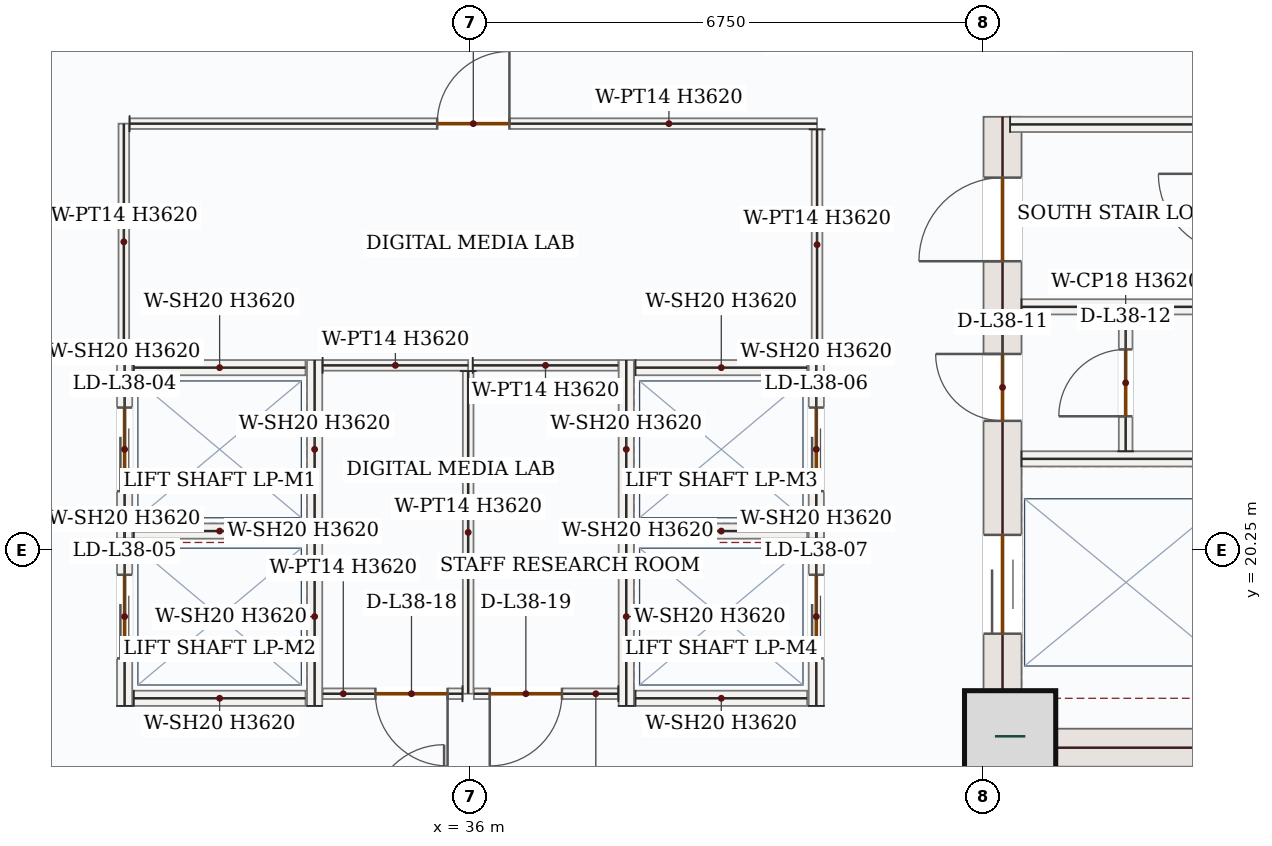
"""IFC4 building model, lengths in metres.
Left out: names, types, materials, properties, quantities, classifications, styles, units other than length and angle.
Written with IfcOpenShell. Run it as: python <this file> out.ifc"""

import sys

from ifc_helpers import new_model, si_unit, direction, frame, frame_2d, origin, origin_2d, place, context, subcontext, project, spatial, rectangle, extrude, source, transform, mapped, element, fill, save


model = new_model("IFC4")
c1 = context("Model", 3, precision=1e-05, world=origin(), true_north=direction((0.0, 1.0)))
c2 = subcontext(c1, "Body", "Model", "MODEL_VIEW")
j1 = project(units=[si_unit("LENGTHUNIT", "METRE"), si_unit("PLANEANGLEUNIT", "RADIAN")], contexts=[c1])
p1 = place(None, origin())
s1 = spatial("IfcSite", under=j1, at=p1, CompositionType="ELEMENT")
p2 = place(p1, origin())
s2 = spatial("IfcBuilding", under=s1, at=p2, CompositionType="ELEMENT")
p3 = place(p2, frame((0.0, 0.0, 166.8)))
s3 = spatial("IfcBuildingStorey", under=s2, at=p3, CompositionType="ELEMENT", Elevation=166.8)
p4 = place(p3, frame((43.0, 17.4, 0.0), z_axis=(0.0, 0.0, 1.0), x_axis=(0.0, 1.0, 0.0)))
e1 = element("IfcWall", 1, at=p4, inside=s3, PredefinedType="SHEAR", context=c2, shape_type="SweptSolid", body=[
    extrude(rectangle(XDim=8.55, YDim=0.5, at=frame_2d((4.275, 0.0))), origin(), (0.0, 0.0, 1.0), 3.62),
])
p5 = place(p4, frame((6.65, 0.0, 0.0)))
e2 = element("IfcOpeningElement", 2, at=p5, cuts=e1, PredefinedType="OPENING", context=c2, shape_type="SweptSolid", body=[
    extrude(rectangle(XDim=1.1, YDim=2.2, at=frame_2d((0.55, 1.1))), frame((0.0, 0.26, 0.0), z_axis=(0.0, -1.0, 0.0), x_axis=(1.0, 0.0, 0.0)), (0.0, 0.0, 1.0), 0.52),
])
p6 = place(p4, frame((1.75, 0.0, 0.0)))
e3 = element("IfcOpeningElement", 3, at=p6, cuts=e1, PredefinedType="OPENING", context=c2, shape_type="SweptSolid", body=[
    extrude(rectangle(XDim=1.3, YDim=2.2, at=frame_2d((0.65, 1.1))), frame((0.0, 0.26, 0.0), z_axis=(0.0, -1.0, 0.0), x_axis=(1.0, 0.0, 0.0)), (0.0, 0.0, 1.0), 0.52),
])
p7 = place(p4, frame((4.55, 0.0, 0.0)))
e4 = element("IfcOpeningElement", 4, at=p7, cuts=e1, PredefinedType="OPENING", context=c2, shape_type="SweptSolid", body=[
    extrude(rectangle(XDim=0.88, YDim=2.1, at=frame_2d((0.44, 1.05))), frame((0.0, 0.26, 0.0), z_axis=(0.0, -1.0, 0.0), x_axis=(1.0, 0.0, 0.0)), (0.0, 0.0, 1.0), 0.52),
])
m1 = source(origin(), c2, "Body", "SweptSolid", [
    extrude(rectangle(XDim=7.0, YDim=0.5, at=frame_2d((3.5, 0.0))), origin(), (0.0, 0.0, 1.0), 3.62),
])
p8 = place(p3, frame((43.25, 17.65, 0.0), z_axis=(0.0, 0.0, 1.0), x_axis=(1.0, 0.0, 0.0)))
e5 = element("IfcWall", 5, at=p8, inside=s3, PredefinedType="SHEAR", context=c2, shape_type="MappedRepresentation", body=[
    mapped(m1, transform((0.0, 0.0, 0.0), x_axis=(1.0, 0.0, 0.0), y_axis=(0.0, 1.0, 0.0), z_axis=(0.0, 0.0, 1.0), scale=1.0)),
])
m2 = source(origin(), c2, "Body", "SweptSolid", [
    extrude(rectangle(XDim=1.2, YDim=1.2, at=origin_2d()), origin(), (0.0, 0.0, 1.0), 3.9),
])
p9 = place(p3, frame((43.1, 17.8, 0.0), z_axis=(0.0, 0.0, 1.0), x_axis=(1.0, 0.0, 0.0)))
e6 = element("IfcColumn", 6, at=p9, inside=s3, PredefinedType="COLUMN", context=c2, shape_type="MappedRepresentation", body=[
    mapped(m2, transform((0.0, 0.0, 0.0), x_axis=(1.0, 0.0, 0.0), y_axis=(0.0, 1.0, 0.0), z_axis=(0.0, 0.0, 1.0), scale=1.0)),
])
m3 = source(origin(), c2, "Body", "SweptSolid", [
    extrude(rectangle(XDim=3.0, YDim=0.2, at=frame_2d((1.5, 0.0))), origin(), (0.0, 0.0, 1.0), 3.62),
])
p10 = place(p3, frame((43.1, 25.85, 0.0), z_axis=(0.0, 0.0, 1.0), x_axis=(1.0, 0.0, 0.0)))
e7 = element("IfcWall", 7, at=p10, inside=s3, PredefinedType="SOLIDWALL", context=c2, shape_type="MappedRepresentation", body=[
    mapped(m3, transform((0.0, 0.0, 0.0), x_axis=(1.0, 0.0, 0.0), y_axis=(0.0, 1.0, 0.0), z_axis=(0.0, 0.0, 1.0), scale=1.0)),
])
m4 = source(origin(), c2, "Body", "SweptSolid", [
    extrude(rectangle(XDim=2.75, YDim=0.2, at=frame_2d((1.375, 0.0))), origin(), (0.0, 0.0, 1.0), 3.62),
])
for number, where, z_axis, x_axis in (
    (8, (43.25, 23.45, 0.0), (0.0, 0.0, 1.0), (1.0, 0.0, 0.0)),
    (9, (43.25, 21.45, 0.0), (0.0, 0.0, 1.0), (1.0, 0.0, 0.0)),
):
    element("IfcWall", number, at=place(p3, frame(where, z_axis=z_axis, x_axis=x_axis)), inside=s3, PredefinedType="SOLIDWALL", context=c2, shape_type="MappedRepresentation", body=[
        mapped(m4, transform((0.0, 0.0, 0.0), x_axis=(1.0, 0.0, 0.0), y_axis=(0.0, 1.0, 0.0), z_axis=(0.0, 0.0, 1.0), scale=1.0)),
    ])
p11 = place(p3, frame((44.62, 21.55, 0.0), z_axis=(0.0, 0.0, 1.0), x_axis=(0.0, 1.0, 0.0)))
e10 = element("IfcWall", 10, at=p11, inside=s3, PredefinedType="PARTITIONING", context=c2, shape_type="SweptSolid", body=[
    extrude(rectangle(XDim=1.8, YDim=0.18, at=frame_2d((0.9, 0.0))), origin(), (0.0, 0.0, 1.0), 3.62),
])
p12 = place(p11, frame((0.46, 0.0, 0.0)))
e11 = element("IfcOpeningElement", 11, at=p12, cuts=e10, PredefinedType="OPENING", context=c2, shape_type="SweptSolid", body=[
    extrude(rectangle(XDim=0.88, YDim=2.1, at=frame_2d((0.44, 1.05))), frame((0.0, 0.1, 0.0), z_axis=(0.0, -1.0, 0.0), x_axis=(1.0, 0.0, 0.0)), (0.0, 0.0, 1.0), 0.2),
])
p13 = place(p3, frame((31.45, 20.4, 0.0), z_axis=(0.0, 0.0, 1.0), x_axis=(0.0, 1.0, 0.0)))
e12 = element("IfcWall", 12, at=p13, inside=s3, PredefinedType="SOLIDWALL", context=c2, shape_type="SweptSolid", body=[
    extrude(rectangle(XDim=2.35, YDim=0.2, at=frame_2d((1.175, 0.0))), origin(), (0.0, 0.0, 1.0), 3.62),
])
p14 = place(p13, frame((0.625, 0.0, 0.0)))
e13 = element("IfcOpeningElement", 13, at=p14, cuts=e12, PredefinedType="OPENING", context=c2, shape_type="SweptSolid", body=[
    extrude(rectangle(XDim=1.1, YDim=2.15, at=frame_2d((0.55, 1.075))), frame((0.0, 0.11, 0.0), z_axis=(0.0, -1.0, 0.0), x_axis=(1.0, 0.0, 0.0)), (0.0, 0.0, 1.0), 0.22),
])
m5 = source(origin(), c2, "Body", "SweptSolid", [
    extrude(rectangle(XDim=2.35, YDim=0.2, at=frame_2d((1.175, 0.0))), origin(), (0.0, 0.0, 1.0), 3.62),
])
p15 = place(p3, frame((33.95, 20.4, 0.0), z_axis=(0.0, 0.0, 1.0), x_axis=(0.0, 1.0, 0.0)))
e14 = element("IfcWall", 14, at=p15, inside=s3, PredefinedType="SOLIDWALL", context=c2, shape_type="MappedRepresentation", body=[
    mapped(m5, transform((0.0, 0.0, 0.0), x_axis=(1.0, 0.0, 0.0), y_axis=(0.0, 1.0, 0.0), z_axis=(0.0, 0.0, 1.0), scale=1.0)),
])
m6 = source(origin(), c2, "Body", "SweptSolid", [
    extrude(rectangle(XDim=2.26, YDim=0.2, at=frame_2d((1.13, 0.0))), origin(), (0.0, 0.0, 1.0), 3.62),
])
for number, where, z_axis, x_axis in (
    (15, (31.57, 20.5, 0.0), (0.0, 0.0, 1.0), (1.0, 0.0, 0.0)),
    (16, (31.57, 22.65, 0.0), (0.0, 0.0, 1.0), (1.0, 0.0, 0.0)),
):
    element("IfcWall", number, at=place(p3, frame(where, z_axis=z_axis, x_axis=x_axis)), inside=s3, PredefinedType="SOLIDWALL", context=c2, shape_type="MappedRepresentation", body=[
        mapped(m6, transform((0.0, 0.0, 0.0), x_axis=(1.0, 0.0, 0.0), y_axis=(0.0, 1.0, 0.0), z_axis=(0.0, 0.0, 1.0), scale=1.0)),
    ])
p16 = place(p3, frame((31.45, 18.2, 0.0), z_axis=(0.0, 0.0, 1.0), x_axis=(0.0, 1.0, 0.0)))
e17 = element("IfcWall", 17, at=p16, inside=s3, PredefinedType="SOLIDWALL", context=c2, shape_type="SweptSolid", body=[
    extrude(rectangle(XDim=2.35, YDim=0.2, at=frame_2d((1.175, 0.0))), origin(), (0.0, 0.0, 1.0), 3.62),
])
p17 = place(p16, frame((0.625, 0.0, 0.0)))
e18 = element("IfcOpeningElement", 18, at=p17, cuts=e17, PredefinedType="OPENING", context=c2, shape_type="SweptSolid", body=[
    extrude(rectangle(XDim=1.1, YDim=2.15, at=frame_2d((0.55, 1.075))), frame((0.0, 0.11, 0.0), z_axis=(0.0, -1.0, 0.0), x_axis=(1.0, 0.0, 0.0)), (0.0, 0.0, 1.0), 0.22),
])
p18 = place(p3, frame((33.95, 18.2, 0.0), z_axis=(0.0, 0.0, 1.0), x_axis=(0.0, 1.0, 0.0)))
e19 = element("IfcWall", 19, at=p18, inside=s3, PredefinedType="SOLIDWALL", context=c2, shape_type="MappedRepresentation", body=[
    mapped(m5, transform((0.0, 0.0, 0.0), x_axis=(1.0, 0.0, 0.0), y_axis=(0.0, 1.0, 0.0), z_axis=(0.0, 0.0, 1.0), scale=1.0)),
])
p19 = place(p3, frame((31.57, 18.3, 0.0), z_axis=(0.0, 0.0, 1.0), x_axis=(1.0, 0.0, 0.0)))
e20 = element("IfcWall", 20, at=p19, inside=s3, PredefinedType="SOLIDWALL", context=c2, shape_type="MappedRepresentation", body=[
    mapped(m6, transform((0.0, 0.0, 0.0), x_axis=(1.0, 0.0, 0.0), y_axis=(0.0, 1.0, 0.0), z_axis=(0.0, 0.0, 1.0), scale=1.0)),
])
p20 = place(p3, frame((38.05, 20.4, 0.0), z_axis=(0.0, 0.0, 1.0), x_axis=(0.0, 1.0, 0.0)))
e21 = element("IfcWall", 21, at=p20, inside=s3, PredefinedType="SOLIDWALL", context=c2, shape_type="MappedRepresentation", body=[
    mapped(m5, transform((0.0, 0.0, 0.0), x_axis=(1.0, 0.0, 0.0), y_axis=(0.0, 1.0, 0.0), z_axis=(0.0, 0.0, 1.0), scale=1.0)),
])
p21 = place(p3, frame((40.55, 20.4, 0.0), z_axis=(0.0, 0.0, 1.0), x_axis=(0.0, 1.0, 0.0)))
e22 = element("IfcWall", 22, at=p21, inside=s3, PredefinedType="SOLIDWALL", context=c2, shape_type="SweptSolid", body=[
    extrude(rectangle(XDim=2.35, YDim=0.2, at=frame_2d((1.175, 0.0))), origin(), (0.0, 0.0, 1.0), 3.62),
])
p22 = place(p21, frame((0.625, 0.0, 0.0)))
e23 = element("IfcOpeningElement", 23, at=p22, cuts=e22, PredefinedType="OPENING", context=c2, shape_type="SweptSolid", body=[
    extrude(rectangle(XDim=1.1, YDim=2.15, at=frame_2d((0.55, 1.075))), frame((0.0, 0.11, 0.0), z_axis=(0.0, -1.0, 0.0), x_axis=(1.0, 0.0, 0.0)), (0.0, 0.0, 1.0), 0.22),
])
for number, where, z_axis, x_axis in (
    (24, (38.17, 20.5, 0.0), (0.0, 0.0, 1.0), (1.0, 0.0, 0.0)),
    (25, (38.17, 22.65, 0.0), (0.0, 0.0, 1.0), (1.0, 0.0, 0.0)),
):
    element("IfcWall", number, at=place(p3, frame(where, z_axis=z_axis, x_axis=x_axis)), inside=s3, PredefinedType="SOLIDWALL", context=c2, shape_type="MappedRepresentation", body=[
        mapped(m6, transform((0.0, 0.0, 0.0), x_axis=(1.0, 0.0, 0.0), y_axis=(0.0, 1.0, 0.0), z_axis=(0.0, 0.0, 1.0), scale=1.0)),
    ])
p23 = place(p3, frame((38.05, 18.2, 0.0), z_axis=(0.0, 0.0, 1.0), x_axis=(0.0, 1.0, 0.0)))
e26 = element("IfcWall", 26, at=p23, inside=s3, PredefinedType="SOLIDWALL", context=c2, shape_type="MappedRepresentation", body=[
    mapped(m5, transform((0.0, 0.0, 0.0), x_axis=(1.0, 0.0, 0.0), y_axis=(0.0, 1.0, 0.0), z_axis=(0.0, 0.0, 1.0), scale=1.0)),
])
p24 = place(p3, frame((40.55, 18.2, 0.0), z_axis=(0.0, 0.0, 1.0), x_axis=(0.0, 1.0, 0.0)))
e27 = element("IfcWall", 27, at=p24, inside=s3, PredefinedType="SOLIDWALL", context=c2, shape_type="SweptSolid", body=[
    extrude(rectangle(XDim=2.35, YDim=0.2, at=frame_2d((1.175, 0.0))), origin(), (0.0, 0.0, 1.0), 3.62),
])
p25 = place(p24, frame((0.625, 0.0, 0.0)))
e28 = element("IfcOpeningElement", 28, at=p25, cuts=e27, PredefinedType="OPENING", context=c2, shape_type="SweptSolid", body=[
    extrude(rectangle(XDim=1.1, YDim=2.15, at=frame_2d((0.55, 1.075))), frame((0.0, 0.11, 0.0), z_axis=(0.0, -1.0, 0.0), x_axis=(1.0, 0.0, 0.0)), (0.0, 0.0, 1.0), 0.22),
])
p26 = place(p3, frame((38.17, 18.3, 0.0), z_axis=(0.0, 0.0, 1.0), x_axis=(1.0, 0.0, 0.0)))
e29 = element("IfcWall", 29, at=p26, inside=s3, PredefinedType="SOLIDWALL", context=c2, shape_type="MappedRepresentation", body=[
    mapped(m6, transform((0.0, 0.0, 0.0), x_axis=(1.0, 0.0, 0.0), y_axis=(0.0, 1.0, 0.0), z_axis=(0.0, 0.0, 1.0), scale=1.0)),
])
m7 = source(origin(), c2, "Body", "SweptSolid", [
    extrude(rectangle(XDim=1.915, YDim=0.14, at=frame_2d((0.958, 0.0))), origin(), (0.0, 0.0, 1.0), 3.62),
])
p27 = place(p3, frame((34.055, 22.68, 0.0), z_axis=(0.0, 0.0, 1.0), x_axis=(1.0, 0.0, 0.0)))
e30 = element("IfcWall", 30, at=p27, inside=s3, PredefinedType="PARTITIONING", context=c2, shape_type="MappedRepresentation", body=[
    mapped(m7, transform((0.0, 0.0, 0.0), x_axis=(1.0, 0.0, 0.0), y_axis=(0.0, 1.0, 0.0), z_axis=(0.0, 0.0, 1.0), scale=1.0)),
])
m8 = source(origin(), c2, "Body", "SweptSolid", [
    extrude(rectangle(XDim=4.245, YDim=0.14, at=frame_2d((2.123, 0.0))), origin(), (0.0, 0.0, 1.0), 3.62),
])
p28 = place(p3, frame((35.97, 22.605, 0.0), z_axis=(0.0, 0.0, 1.0), x_axis=(0.0, -1.0, 0.0)))
e31 = element("IfcWall", 31, at=p28, inside=s3, PredefinedType="PARTITIONING", context=c2, shape_type="MappedRepresentation", body=[
    mapped(m8, transform((0.0, 0.0, 0.0), x_axis=(1.0, 0.0, 0.0), y_axis=(0.0, 1.0, 0.0), z_axis=(0.0, 0.0, 1.0), scale=1.0)),
])
p29 = place(p3, frame((35.895, 18.36, 0.0), z_axis=(0.0, 0.0, 1.0), x_axis=(-1.0, 0.0, 0.0)))
e32 = element("IfcWall", 32, at=p29, inside=s3, PredefinedType="PARTITIONING", context=c2, shape_type="SweptSolid", body=[
    extrude(rectangle(XDim=1.84, YDim=0.14, at=frame_2d((0.92, 0.0))), origin(), (0.0, 0.0, 1.0), 3.62),
])
p30 = place(p29, frame((0.196, 0.0, 0.0)))
e33 = element("IfcOpeningElement", 33, at=p30, cuts=e32, PredefinedType="OPENING", context=c2, shape_type="SweptSolid", body=[
    extrude(rectangle(XDim=0.95, YDim=2.15, at=frame_2d((0.475, 1.075))), frame((0.0, 0.08, 0.0), z_axis=(0.0, -1.0, 0.0), x_axis=(1.0, 0.0, 0.0)), (0.0, 0.0, 1.0), 0.16),
])
p31 = place(p3, frame((36.03, 22.68, 0.0), z_axis=(0.0, 0.0, 1.0), x_axis=(1.0, 0.0, 0.0)))
e34 = element("IfcWall", 34, at=p31, inside=s3, PredefinedType="PARTITIONING", context=c2, shape_type="MappedRepresentation", body=[
    mapped(m7, transform((0.0, 0.0, 0.0), x_axis=(1.0, 0.0, 0.0), y_axis=(0.0, 1.0, 0.0), z_axis=(0.0, 0.0, 1.0), scale=1.0)),
])
p32 = place(p3, frame((37.945, 18.36, 0.0), z_axis=(0.0, 0.0, 1.0), x_axis=(-1.0, 0.0, 0.0)))
e35 = element("IfcWall", 35, at=p32, inside=s3, PredefinedType="PARTITIONING", context=c2, shape_type="SweptSolid", body=[
    extrude(rectangle(XDim=1.9, YDim=0.14, at=frame_2d((0.95, 0.0))), origin(), (0.0, 0.0, 1.0), 3.62),
])
p33 = place(p32, frame((0.741, 0.0, 0.0)))
e36 = element("IfcOpeningElement", 36, at=p33, cuts=e35, PredefinedType="OPENING", context=c2, shape_type="SweptSolid", body=[
    extrude(rectangle(XDim=0.95, YDim=2.15, at=frame_2d((0.475, 1.075))), frame((0.0, 0.08, 0.0), z_axis=(0.0, -1.0, 0.0), x_axis=(1.0, 0.0, 0.0)), (0.0, 0.0, 1.0), 0.16),
])
m9 = source(origin(), c2, "Body", "SweptSolid", [
    extrude(rectangle(XDim=3.11, YDim=0.14, at=frame_2d((1.555, 0.0))), origin(), (0.0, 0.0, 1.0), 3.62),
])
p34 = place(p3, frame((31.44, 22.75, 0.0), z_axis=(0.0, 0.0, 1.0), x_axis=(0.0, 1.0, 0.0)))
e37 = element("IfcWall", 37, at=p34, inside=s3, PredefinedType="PARTITIONING", context=c2, shape_type="MappedRepresentation", body=[
    mapped(m9, transform((0.0, 0.0, 0.0), x_axis=(1.0, 0.0, 0.0), y_axis=(0.0, 1.0, 0.0), z_axis=(0.0, 0.0, 1.0), scale=1.0)),
])
p35 = place(p3, frame((31.515, 25.86, 0.0), z_axis=(0.0, 0.0, 1.0), x_axis=(1.0, 0.0, 0.0)))
e38 = element("IfcWall", 38, at=p35, inside=s3, PredefinedType="PARTITIONING", context=c2, shape_type="SweptSolid", body=[
    extrude(rectangle(XDim=9.045, YDim=0.14, at=frame_2d((4.522, 0.0))), origin(), (0.0, 0.0, 1.0), 3.62),
])
p36 = place(p35, frame((4.048, 0.0, 0.0)))
e39 = element("IfcOpeningElement", 39, at=p36, cuts=e38, PredefinedType="OPENING", context=c2, shape_type="SweptSolid", body=[
    extrude(rectangle(XDim=0.95, YDim=2.15, at=frame_2d((0.475, 1.075))), frame((0.0, 0.08, 0.0), z_axis=(0.0, -1.0, 0.0), x_axis=(1.0, 0.0, 0.0)), (0.0, 0.0, 1.0), 0.16),
])
m10 = source(origin(), c2, "Body", "SweptSolid", [
    extrude(rectangle(XDim=3.035, YDim=0.14, at=frame_2d((1.518, 0.0))), origin(), (0.0, 0.0, 1.0), 3.62),
])
p37 = place(p3, frame((40.56, 25.785, 0.0), z_axis=(0.0, 0.0, 1.0), x_axis=(0.0, -1.0, 0.0)))
e40 = element("IfcWall", 40, at=p37, inside=s3, PredefinedType="PARTITIONING", context=c2, shape_type="MappedRepresentation", body=[
    mapped(m10, transform((0.0, 0.0, 0.0), x_axis=(1.0, 0.0, 0.0), y_axis=(0.0, 1.0, 0.0), z_axis=(0.0, 0.0, 1.0), scale=1.0)),
])
m11 = source(origin(), c2, "Body", "SweptSolid", [
    extrude(rectangle(XDim=1.1, YDim=2.2, at=frame_2d((0.55, 1.1))), frame((0.0, 0.025, 0.0), z_axis=(0.0, -1.0, 0.0), x_axis=(1.0, 0.0, 0.0)), (0.0, 0.0, 1.0), 0.05),
])
p38 = place(p5, origin())
e41 = element("IfcDoor", 41, at=p38, inside=s3, OperationType="SINGLE_SWING_LEFT", PredefinedType="DOOR", context=c2, shape_type="MappedRepresentation", body=[
    mapped(m11, transform((0.0, 0.0, 0.0), x_axis=(1.0, 0.0, 0.0), y_axis=(0.0, 1.0, 0.0), z_axis=(0.0, 0.0, 1.0), scale=1.0)),
])
fill(e2, e41)
m12 = source(origin(), c2, "Body", "SweptSolid", [
    extrude(rectangle(XDim=1.3, YDim=2.2, at=frame_2d((0.65, 1.1))), frame((0.0, 0.025, 0.0), z_axis=(0.0, -1.0, 0.0), x_axis=(1.0, 0.0, 0.0)), (0.0, 0.0, 1.0), 0.05),
])
p39 = place(p6, origin())
e42 = element("IfcDoor", 42, at=p39, inside=s3, OperationType="DOUBLE_DOOR_SLIDING", PredefinedType="DOOR", context=c2, shape_type="MappedRepresentation", body=[
    mapped(m12, transform((0.0, 0.0, 0.0), x_axis=(1.0, 0.0, 0.0), y_axis=(0.0, 1.0, 0.0), z_axis=(0.0, 0.0, 1.0), scale=1.0)),
])
fill(e3, e42)
m13 = source(origin(), c2, "Body", "SweptSolid", [
    extrude(rectangle(XDim=0.88, YDim=2.1, at=frame_2d((0.44, 1.05))), frame((0.0, 0.025, 0.0), z_axis=(0.0, -1.0, 0.0), x_axis=(1.0, 0.0, 0.0)), (0.0, 0.0, 1.0), 0.05),
])
p40 = place(p7, origin())
e43 = element("IfcDoor", 43, at=p40, inside=s3, OperationType="SINGLE_SWING_RIGHT", PredefinedType="DOOR", context=c2, shape_type="MappedRepresentation", body=[
    mapped(m13, transform((0.0, 0.0, 0.0), x_axis=(1.0, 0.0, 0.0), y_axis=(0.0, 1.0, 0.0), z_axis=(0.0, 0.0, 1.0), scale=1.0)),
])
fill(e4, e43)
p41 = place(p12, origin())
e44 = element("IfcDoor", 44, at=p41, inside=s3, OperationType="SINGLE_SWING_LEFT", PredefinedType="DOOR", context=c2, shape_type="MappedRepresentation", body=[
    mapped(m13, transform((0.0, 0.0, 0.0), x_axis=(1.0, 0.0, 0.0), y_axis=(0.0, 1.0, 0.0), z_axis=(0.0, 0.0, 1.0), scale=1.0)),
])
fill(e11, e44)
m14 = source(origin(), c2, "Body", "SweptSolid", [
    extrude(rectangle(XDim=1.1, YDim=2.15, at=frame_2d((0.55, 1.075))), frame((0.0, 0.025, 0.0), z_axis=(0.0, -1.0, 0.0), x_axis=(1.0, 0.0, 0.0)), (0.0, 0.0, 1.0), 0.05),
])
p42 = place(p14, origin())
e45 = element("IfcDoor", 45, at=p42, inside=s3, OperationType="DOUBLE_DOOR_SLIDING", PredefinedType="DOOR", context=c2, shape_type="MappedRepresentation", body=[
    mapped(m14, transform((0.0, 0.0, 0.0), x_axis=(1.0, 0.0, 0.0), y_axis=(0.0, 1.0, 0.0), z_axis=(0.0, 0.0, 1.0), scale=1.0)),
])
fill(e13, e45)
p43 = place(p17, origin())
e46 = element("IfcDoor", 46, at=p43, inside=s3, OperationType="DOUBLE_DOOR_SLIDING", PredefinedType="DOOR", context=c2, shape_type="MappedRepresentation", body=[
    mapped(m14, transform((0.0, 0.0, 0.0), x_axis=(1.0, 0.0, 0.0), y_axis=(0.0, 1.0, 0.0), z_axis=(0.0, 0.0, 1.0), scale=1.0)),
])
fill(e18, e46)
p44 = place(p22, origin())
e47 = element("IfcDoor", 47, at=p44, inside=s3, OperationType="DOUBLE_DOOR_SLIDING", PredefinedType="DOOR", context=c2, shape_type="MappedRepresentation", body=[
    mapped(m14, transform((0.0, 0.0, 0.0), x_axis=(1.0, 0.0, 0.0), y_axis=(0.0, 1.0, 0.0), z_axis=(0.0, 0.0, 1.0), scale=1.0)),
])
fill(e23, e47)
p45 = place(p25, origin())
e48 = element("IfcDoor", 48, at=p45, inside=s3, OperationType="DOUBLE_DOOR_SLIDING", PredefinedType="DOOR", context=c2, shape_type="MappedRepresentation", body=[
    mapped(m14, transform((0.0, 0.0, 0.0), x_axis=(1.0, 0.0, 0.0), y_axis=(0.0, 1.0, 0.0), z_axis=(0.0, 0.0, 1.0), scale=1.0)),
])
fill(e28, e48)
m15 = source(origin(), c2, "Body", "SweptSolid", [
    extrude(rectangle(XDim=0.95, YDim=2.15, at=frame_2d((0.475, 1.075))), frame((0.0, 0.025, 0.0), z_axis=(0.0, -1.0, 0.0), x_axis=(1.0, 0.0, 0.0)), (0.0, 0.0, 1.0), 0.05),
])
p46 = place(p36, origin())
e49 = element("IfcDoor", 49, at=p46, inside=s3, OperationType="SINGLE_SWING_RIGHT", PredefinedType="DOOR", context=c2, shape_type="MappedRepresentation", body=[
    mapped(m15, transform((0.0, 0.0, 0.0), x_axis=(1.0, 0.0, 0.0), y_axis=(0.0, 1.0, 0.0), z_axis=(0.0, 0.0, 1.0), scale=1.0)),
])
fill(e39, e49)
p47 = place(p30, origin())
e50 = element("IfcDoor", 50, at=p47, inside=s3, OperationType="SINGLE_SWING_LEFT", PredefinedType="DOOR", context=c2, shape_type="MappedRepresentation", body=[
    mapped(m15, transform((0.0, 0.0, 0.0), x_axis=(1.0, 0.0, 0.0), y_axis=(0.0, 1.0, 0.0), z_axis=(0.0, 0.0, 1.0), scale=1.0)),
])
fill(e33, e50)
p48 = place(p33, origin())
e51 = element("IfcDoor", 51, at=p48, inside=s3, OperationType="SINGLE_SWING_RIGHT", PredefinedType="DOOR", context=c2, shape_type="MappedRepresentation", body=[
    mapped(m15, transform((0.0, 0.0, 0.0), x_axis=(1.0, 0.0, 0.0), y_axis=(0.0, 1.0, 0.0), z_axis=(0.0, 0.0, 1.0), scale=1.0)),
])
fill(e36, e51)
save(model, sys.argv[1])
